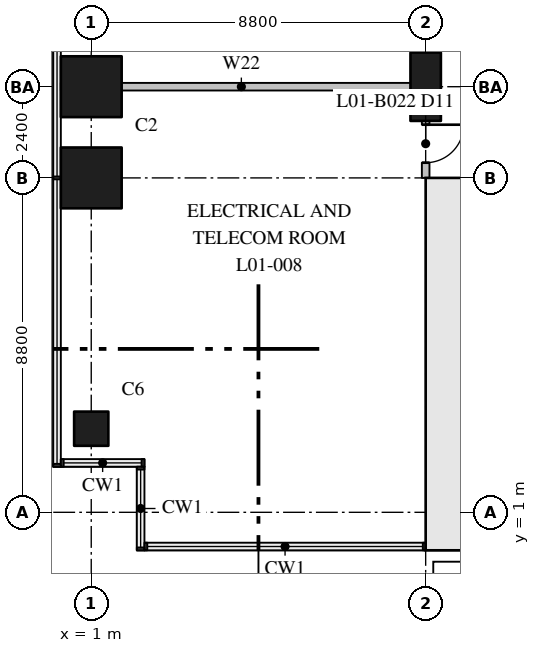
"""IFC4 building model, lengths in metres.
Left out: names, types, materials, properties, quantities, classifications, styles, units other than length and angle.
Written with IfcOpenShell. Run it as: python <this file> out.ifc"""

import sys

from ifc_helpers import new_model, si_unit, direction, frame, frame_2d, origin, origin_2d, place, context, subcontext, project, spatial, rectangle, extrude, element, fill, save


model = new_model("IFC4")
c1 = context("Model", 3, precision=1e-05, world=origin(), true_north=direction((0.0, 1.0)))
c2 = subcontext(c1, "Body", "Model", "MODEL_VIEW")
j1 = project(units=[si_unit("LENGTHUNIT", "METRE"), si_unit("PLANEANGLEUNIT", "RADIAN")], contexts=[c1])
p1 = place(None, origin())
s1 = spatial("IfcSite", under=j1, at=p1, CompositionType="ELEMENT")
p2 = place(p1, origin())
s2 = spatial("IfcBuilding", under=s1, at=p2, CompositionType="ELEMENT")
p3 = place(p2, frame((0.0, 0.0, 7.5)))
s3 = spatial("IfcBuildingStorey", under=s2, at=p3, CompositionType="ELEMENT", Elevation=7.5)
p4 = place(p3, frame((1.0, 3.2, 0.0), z_axis=(0.0, 0.0, 1.0), x_axis=(1.0, 0.0, 0.0)))
e1 = element("IfcColumn", 1, at=p4, inside=s3, PredefinedType="COLUMN", context=c2, shape_type="SweptSolid", body=[
    extrude(rectangle(XDim=0.9, YDim=0.9, at=origin_2d()), origin(), (0.0, 0.0, 1.0), 5.5),
])
for number, where, z_axis, x_axis in (
    (2, (1.0, 9.8, 0.0), (0.0, 0.0, 1.0), (1.0, 0.0, 0.0)),
    (3, (1.0, 12.2, 0.0), (0.0, 0.0, 1.0), (1.0, 0.0, 0.0)),
):
    element("IfcColumn", number, at=place(p3, frame(where, z_axis=z_axis, x_axis=x_axis)), inside=s3, PredefinedType="COLUMN", context=c2, shape_type="SweptSolid", body=[
        extrude(rectangle(XDim=1.6, YDim=1.6, at=origin_2d()), origin(), (0.0, 0.0, 1.0), 5.5),
    ])
p5 = place(p3, frame((9.8, 12.2, 0.0), z_axis=(0.0, 0.0, 1.0), x_axis=(0.0, 1.0, 0.0)))
e4 = element("IfcColumn", 4, at=p5, inside=s3, PredefinedType="COLUMN", context=c2, shape_type="SweptSolid", body=[
    extrude(rectangle(XDim=1.8, YDim=0.8, at=origin_2d()), origin(), (0.0, 0.0, 1.0), 5.5),
])
p6 = place(p3, frame((9.8, 0.6, 0.0), z_axis=(0.0, 0.0, 1.0), x_axis=(1.0, 0.0, 0.0)))
e5 = element("IfcWall", 5, at=p6, inside=s3, PredefinedType="SHEAR", context=c2, shape_type="SweptSolid", body=[
    extrude(rectangle(XDim=35.2, YDim=1.2, at=frame_2d((17.6, 0.0))), origin(), (0.0, 0.0, 1.0), 5.5),
])
p7 = place(p3, frame((10.4, 1.2, 0.0), z_axis=(0.0, 0.0, 1.0), x_axis=(0.0, 1.0, 0.0)))
e6 = element("IfcWall", 6, at=p7, inside=s3, PredefinedType="SHEAR", context=c2, shape_type="SweptSolid", body=[
    extrude(rectangle(XDim=8.6, YDim=1.2, at=frame_2d((4.3, 0.0))), origin(), (0.0, 0.0, 1.0), 5.5),
])
p8 = place(p3, frame((9.8, 9.6, 0.0), z_axis=(0.0, 0.0, 1.0), x_axis=(1.0, 0.0, 0.0)))
e7 = element("IfcWall", 7, at=p8, inside=s3, PredefinedType="SHEAR", context=c2, shape_type="SweptSolid", body=[
    extrude(rectangle(XDim=4.3, YDim=0.4, at=frame_2d((2.15, 0.0))), origin(), (0.0, 0.0, 1.0), 5.5),
])
p9 = place(p8, frame((2.05, 0.0, 0.0)))
e8 = element("IfcOpeningElement", 8, at=p9, cuts=e7, PredefinedType="OPENING", context=c2, shape_type="SweptSolid", body=[
    extrude(rectangle(XDim=1.2, YDim=2.1, at=frame_2d((0.6, 1.05))), frame((0.0, 0.21, 0.0), z_axis=(0.0, -1.0, 0.0), x_axis=(1.0, 0.0, 0.0)), (0.0, 0.0, 1.0), 0.42),
])
p10 = place(p3, frame((0.2, 12.2, 0.0), z_axis=(0.0, 0.0, 1.0), x_axis=(1.0, 0.0, 0.0)))
e9 = element("IfcWall", 9, at=p10, inside=s3, PredefinedType="PARTITIONING", context=c2, shape_type="SweptSolid", body=[
    extrude(rectangle(XDim=9.5, YDim=0.2, at=frame_2d((4.75, 0.0))), origin(), (0.0, 0.0, 1.0), 5.1),
])
p11 = place(p3, frame((9.8, 9.8, 0.0), z_axis=(0.0, 0.0, 1.0), x_axis=(0.0, 1.0, 0.0)))
e10 = element("IfcWall", 10, at=p11, inside=s3, PredefinedType="PARTITIONING", context=c2, shape_type="SweptSolid", body=[
    extrude(rectangle(XDim=48.0, YDim=0.2, at=frame_2d((24.0, 0.0))), origin(), (0.0, 0.0, 1.0), 5.1),
])
p12 = place(p11, frame((6.61, 0.0, 0.0)))
e11 = element("IfcOpeningElement", 11, at=p12, cuts=e10, PredefinedType="OPENING", context=c2, shape_type="SweptSolid", body=[
    extrude(rectangle(XDim=1.0, YDim=2.1, at=frame_2d((0.5, 1.05))), frame((0.0, 0.11, 0.0), z_axis=(0.0, -1.0, 0.0), x_axis=(1.0, 0.0, 0.0)), (0.0, 0.0, 1.0), 0.22),
])
p13 = place(p11, frame((14.545, 0.0, 0.0)))
e12 = element("IfcOpeningElement", 12, at=p13, cuts=e10, PredefinedType="OPENING", context=c2, shape_type="SweptSolid", body=[
    extrude(rectangle(XDim=1.0, YDim=2.1, at=frame_2d((0.5, 1.05))), frame((0.0, 0.11, 0.0), z_axis=(0.0, -1.0, 0.0), x_axis=(1.0, 0.0, 0.0)), (0.0, 0.0, 1.0), 0.22),
])
p14 = place(p11, frame((22.38, 0.0, 0.0)))
e13 = element("IfcOpeningElement", 13, at=p14, cuts=e10, PredefinedType="OPENING", context=c2, shape_type="SweptSolid", body=[
    extrude(rectangle(XDim=1.0, YDim=2.1, at=frame_2d((0.5, 1.05))), frame((0.0, 0.11, 0.0), z_axis=(0.0, -1.0, 0.0), x_axis=(1.0, 0.0, 0.0)), (0.0, 0.0, 1.0), 0.22),
])
p15 = place(p11, frame((29.984, 0.0, 0.0)))
e14 = element("IfcOpeningElement", 14, at=p15, cuts=e10, PredefinedType="OPENING", context=c2, shape_type="SweptSolid", body=[
    extrude(rectangle(XDim=1.0, YDim=2.1, at=frame_2d((0.5, 1.05))), frame((0.0, 0.11, 0.0), z_axis=(0.0, -1.0, 0.0), x_axis=(1.0, 0.0, 0.0)), (0.0, 0.0, 1.0), 0.22),
])
p16 = place(p11, frame((40.235, 0.0, 0.0)))
e15 = element("IfcOpeningElement", 15, at=p16, cuts=e10, PredefinedType="OPENING", context=c2, shape_type="SweptSolid", body=[
    extrude(rectangle(XDim=1.0, YDim=2.1, at=frame_2d((0.5, 1.05))), frame((0.0, 0.11, 0.0), z_axis=(0.0, -1.0, 0.0), x_axis=(1.0, 0.0, 0.0)), (0.0, 0.0, 1.0), 0.22),
])
p17 = place(p11, frame((44.967, 0.0, 0.0)))
e16 = element("IfcOpeningElement", 16, at=p17, cuts=e10, PredefinedType="OPENING", context=c2, shape_type="SweptSolid", body=[
    extrude(rectangle(XDim=1.0, YDim=2.1, at=frame_2d((0.5, 1.05))), frame((0.0, 0.11, 0.0), z_axis=(0.0, -1.0, 0.0), x_axis=(1.0, 0.0, 0.0)), (0.0, 0.0, 1.0), 0.22),
])
p18 = place(p11, frame((0.4, 0.0, 0.0)))
e17 = element("IfcOpeningElement", 17, at=p18, cuts=e10, PredefinedType="OPENING", context=c2, shape_type="SweptSolid", body=[
    extrude(rectangle(XDim=1.0, YDim=2.1, at=frame_2d((0.5, 1.05))), frame((0.0, 0.11, 0.0), z_axis=(0.0, -1.0, 0.0), x_axis=(1.0, 0.0, 0.0)), (0.0, 0.0, 1.0), 0.22),
])
p19 = place(p18, frame((1.0, 0.0, 0.0), z_axis=(0.0, 0.0, 1.0), x_axis=(-1.0, 0.0, 0.0)))
e18 = element("IfcDoor", 18, at=p19, inside=s3, OperationType="SINGLE_SWING_RIGHT", PredefinedType="DOOR", context=c2, shape_type="SweptSolid", body=[
    extrude(rectangle(XDim=1.0, YDim=2.1, at=frame_2d((0.5, 1.05))), frame((0.0, 0.025, 0.0), z_axis=(0.0, -1.0, 0.0), x_axis=(1.0, 0.0, 0.0)), (0.0, 0.0, 1.0), 0.05),
])
fill(e17, e18)
save(model, sys.argv[1])
